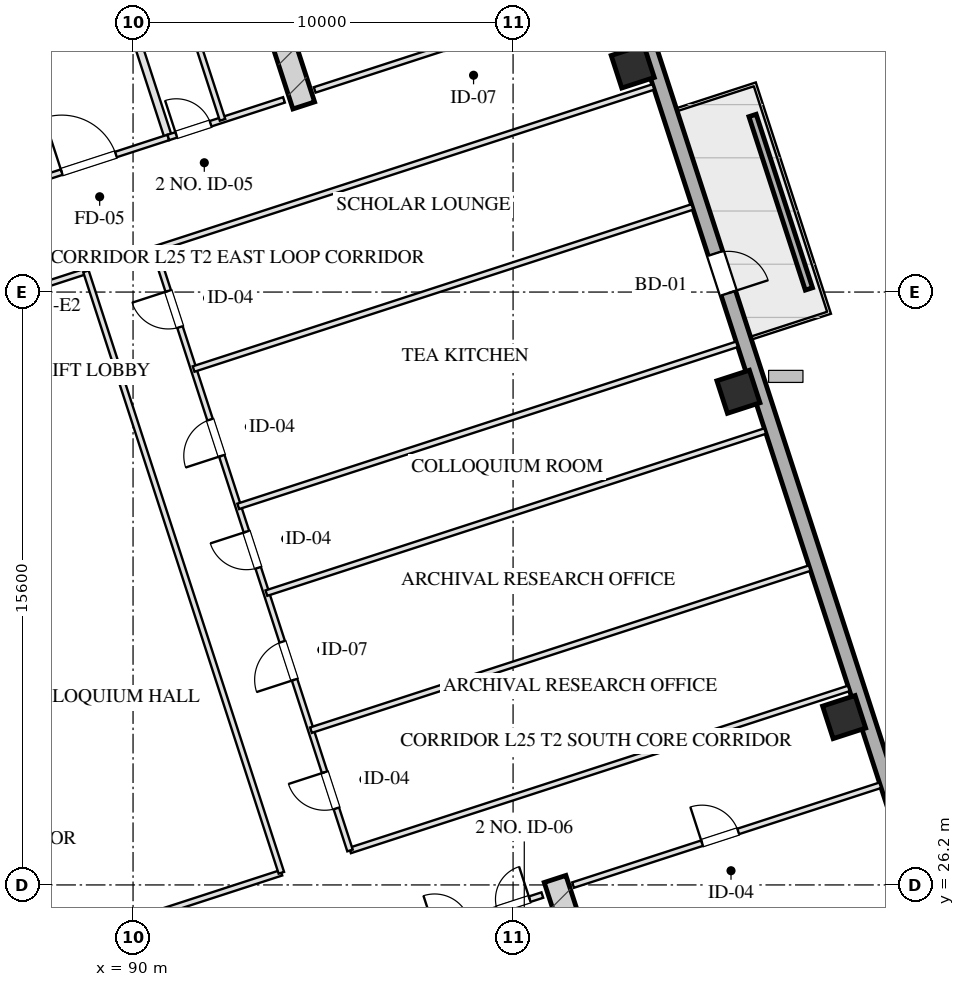
"""IFC4 building model, lengths in metres.
Left out: names, types, materials, properties, quantities, classifications, styles, units other than length and angle.
Written with IfcOpenShell. Run it as: python <this file> out.ifc"""

import sys

from ifc_helpers import new_model, si_unit, direction, frame, frame_2d, origin, origin_2d, place, context, subcontext, project, spatial, rectangle, hollow_rectangle, extrude, element, fill, save


model = new_model("IFC4")
c1 = context("Model", 3, precision=1e-05, world=origin(), true_north=direction((0.0, 1.0)))
c2 = subcontext(c1, "Body", "Model", "MODEL_VIEW")
j1 = project(units=[si_unit("LENGTHUNIT", "METRE"), si_unit("PLANEANGLEUNIT", "RADIAN")], contexts=[c1])
p1 = place(None, origin())
s1 = spatial("IfcSite", under=j1, at=p1, CompositionType="ELEMENT")
p2 = place(p1, origin())
s2 = spatial("IfcBuilding", under=s1, at=p2, CompositionType="ELEMENT")
p3 = place(p2, frame((0.0, 0.0, 100.05)))
s3 = spatial("IfcBuildingStorey", under=s2, at=p3, CompositionType="ELEMENT", Elevation=100.05)
for number, where, z_axis, x_axis in (
    (1, (101.105, 26.358, 0.0), (0.0, 0.0, 1.0), (0.309, -0.951, 0.0)),
    (2, (94.492, 46.71, 0.0), (0.0, 0.0, 1.0), (-0.309, 0.951, 0.0)),
):
    element("IfcWall", number, at=place(p3, frame(where, z_axis=z_axis, x_axis=x_axis)), inside=s3, PredefinedType="SHEAR", context=c2, shape_type="SweptSolid", body=[
        extrude(rectangle(XDim=9.48, YDim=0.6, at=frame_2d((4.74, 0.0))), origin(), (0.0, 0.0, 1.0), 3.45),
    ])
for number, where, z_axis, x_axis in (
    (3, (108.711, 30.616, 0.0), (0.0, 0.0, 1.0), (0.951, 0.309, 0.0)),
    (4, (105.93, 39.176, 0.0), (0.0, 0.0, 1.0), (0.951, 0.309, 0.0)),
    (5, (103.149, 47.736, 0.0), (0.0, 0.0, 1.0), (0.951, 0.309, 0.0)),
):
    element("IfcColumn", number, at=place(p3, frame(where, z_axis=z_axis, x_axis=x_axis)), inside=s3, PredefinedType="COLUMN", context=c2, shape_type="SweptSolid", body=[
        extrude(hollow_rectangle(XDim=0.9, YDim=0.9, WallThickness=0.032, at=origin_2d()), origin(), (0.0, 0.0, 1.0), 3.451),
    ])
p4 = place(p3, frame((99.284, 61.41, 0.0), z_axis=(0.0, 0.0, 1.0), x_axis=(0.309017542002, -0.95105633836, 0.0)))
e6 = element("IfcWall", 6, at=p4, inside=s3, PredefinedType="SOLIDWALL", context=c2, shape_type="SweptSolid", body=[
    extrude(rectangle(XDim=46.4, YDim=0.4, at=frame_2d((23.2, 0.0))), origin(), (0.0, 0.0, 1.0), 2.55),
])
p5 = place(p4, frame((19.55, 0.0, 0.0)))
e7 = element("IfcOpeningElement", 7, at=p5, cuts=e6, PredefinedType="OPENING", context=c2, shape_type="SweptSolid", body=[
    extrude(rectangle(XDim=1.1, YDim=2.15, at=frame_2d((0.55, 1.075))), frame((0.0, 0.21, 0.0), z_axis=(0.0, -1.0, 0.0), x_axis=(1.0, 0.0, 0.0)), (0.0, 0.0, 1.0), 0.42),
])
p6 = place(p3, frame((107.785, 41.882, 0.0), z_axis=(0.0, 0.0, 1.0), x_axis=(-0.309032019345, 0.951051634255, 0.0)))
e8 = element("IfcWall", 8, at=p6, inside=s3, PredefinedType="PARAPET", context=c2, shape_type="SweptSolid", body=[
    extrude(rectangle(XDim=4.8, YDim=0.2, at=frame_2d((2.4, 0.0))), origin(), (0.0, 0.0, 1.0), 0.75),
])
p7 = place(p3, frame((97.727, 24.944, 0.0), z_axis=(0.0, 0.0, 1.0), x_axis=(0.951036872128, 0.309077446369, 0.0)))
e9 = element("IfcWall", 9, at=p7, inside=s3, PredefinedType="PARTITIONING", context=c2, shape_type="SweptSolid", body=[
    extrude(rectangle(XDim=3.2, YDim=0.15, at=frame_2d((1.6, 0.0))), origin(), (0.0, 0.0, 1.0), 3.155),
])
p8 = place(p7, frame((0.22, 0.0, 0.0)))
e10 = element("IfcOpeningElement", 10, at=p8, cuts=e9, PredefinedType="OPENING", context=c2, shape_type="SweptSolid", body=[
    extrude(rectangle(XDim=0.95, YDim=2.05, at=frame_2d((0.475, 1.025))), frame((0.0, 0.085, 0.0), z_axis=(0.0, -1.0, 0.0), x_axis=(1.0, 0.0, 0.0)), (0.0, 0.0, 1.0), 0.17),
])
p9 = place(p7, frame((1.95, 0.0, 0.0)))
e11 = element("IfcOpeningElement", 11, at=p9, cuts=e9, PredefinedType="OPENING", context=c2, shape_type="SweptSolid", body=[
    extrude(rectangle(XDim=0.9, YDim=2.05, at=frame_2d((0.45, 1.025))), frame((0.0, 0.085, 0.0), z_axis=(0.0, -1.0, 0.0), x_axis=(1.0, 0.0, 0.0)), (0.0, 0.0, 1.0), 0.17),
])
p10 = place(p3, frame((90.928, 45.868, 0.0), z_axis=(0.0, 0.0, 1.0), x_axis=(-0.309042196757, 0.951048327176, 0.0)))
e12 = element("IfcWall", 12, at=p10, inside=s3, PredefinedType="PARTITIONING", context=c2, shape_type="SweptSolid", body=[
    extrude(rectangle(XDim=8.43, YDim=0.2, at=frame_2d((4.215, 0.0))), origin(), (0.0, 0.0, 1.0), 3.155),
])
p11 = place(p3, frame((86.743, 44.508, 0.0), z_axis=(0.0, 0.0, 1.0), x_axis=(0.951063829732, 0.308994485023, 0.0)))
e13 = element("IfcWall", 13, at=p11, inside=s3, PredefinedType="PARTITIONING", context=c2, shape_type="SweptSolid", body=[
    extrude(rectangle(XDim=4.4, YDim=0.15, at=frame_2d((2.2, 0.0))), origin(), (0.0, 0.0, 1.0), 3.155),
])
p12 = place(p11, frame((1.45, 0.0, 0.0)))
e14 = element("IfcOpeningElement", 14, at=p12, cuts=e13, PredefinedType="OPENING", context=c2, shape_type="SweptSolid", body=[
    extrude(rectangle(XDim=1.5, YDim=2.05, at=frame_2d((0.75, 1.025))), frame((0.0, 0.085, 0.0), z_axis=(0.0, -1.0, 0.0), x_axis=(1.0, 0.0, 0.0)), (0.0, 0.0, 1.0), 0.17),
])
p13 = place(p3, frame((85.718, 47.666, 0.0), z_axis=(0.0, 0.0, 1.0), x_axis=(0.951058531764, 0.30901079133, 0.0)))
e15 = element("IfcWall", 15, at=p13, inside=s3, PredefinedType="PARTITIONING", context=c2, shape_type="SweptSolid", body=[
    extrude(rectangle(XDim=4.4, YDim=0.2, at=frame_2d((2.2, 0.0))), origin(), (0.0, 0.0, 1.0), 3.155),
])
p14 = place(p13, frame((0.45, 0.0, 0.0)))
e16 = element("IfcOpeningElement", 16, at=p14, cuts=e15, PredefinedType="OPENING", context=c2, shape_type="SweptSolid", body=[
    extrude(rectangle(XDim=1.1, YDim=2.05, at=frame_2d((0.55, 1.025))), frame((0.0, 0.11, 0.0), z_axis=(0.0, -1.0, 0.0), x_axis=(1.0, 0.0, 0.0)), (0.0, 0.0, 1.0), 0.22),
])
p15 = place(p13, frame((2.55, 0.0, 0.0)))
e17 = element("IfcOpeningElement", 17, at=p15, cuts=e15, PredefinedType="OPENING", context=c2, shape_type="SweptSolid", body=[
    extrude(rectangle(XDim=1.1, YDim=2.05, at=frame_2d((0.55, 1.025))), frame((0.0, 0.11, 0.0), z_axis=(0.0, -1.0, 0.0), x_axis=(1.0, 0.0, 0.0)), (0.0, 0.0, 1.0), 0.22),
])
p16 = place(p3, frame((90.928, 45.868, 0.0), z_axis=(0.0, 0.0, 1.0), x_axis=(0.951059297078, 0.309008435874, 0.0)))
e18 = element("IfcWall", 18, at=p16, inside=s3, PredefinedType="PARTITIONING", context=c2, shape_type="SweptSolid", body=[
    extrude(rectangle(XDim=3.2, YDim=0.15, at=frame_2d((1.6, 0.0))), origin(), (0.0, 0.0, 1.0), 3.155),
])
p17 = place(p16, frame((0.22, 0.0, 0.0)))
e19 = element("IfcOpeningElement", 19, at=p17, cuts=e18, PredefinedType="OPENING", context=c2, shape_type="SweptSolid", body=[
    extrude(rectangle(XDim=0.95, YDim=2.05, at=frame_2d((0.475, 1.025))), frame((0.0, 0.085, 0.0), z_axis=(0.0, -1.0, 0.0), x_axis=(1.0, 0.0, 0.0)), (0.0, 0.0, 1.0), 0.17),
])
p18 = place(p3, frame((92.355, 46.331, 0.0), z_axis=(0.0, 0.0, 1.0), x_axis=(-0.309007490203, 0.951059604335, 0.0)))
e20 = element("IfcWall", 20, at=p18, inside=s3, PredefinedType="PARTITIONING", context=c2, shape_type="SweptSolid", body=[
    extrude(rectangle(XDim=8.43, YDim=0.15, at=frame_2d((4.215, 0.0))), origin(), (0.0, 0.0, 1.0), 3.155),
])
p19 = place(p18, frame((2.55, 0.0, 0.0)))
e21 = element("IfcOpeningElement", 21, at=p19, cuts=e20, PredefinedType="OPENING", context=c2, shape_type="SweptSolid", body=[
    extrude(rectangle(XDim=0.95, YDim=2.05, at=frame_2d((0.475, 1.025))), frame((0.0, 0.085, 0.0), z_axis=(0.0, -1.0, 0.0), x_axis=(1.0, 0.0, 0.0)), (0.0, 0.0, 1.0), 0.17),
])
p20 = place(p18, frame((5.8, 0.0, 0.0)))
e22 = element("IfcOpeningElement", 22, at=p20, cuts=e20, PredefinedType="OPENING", context=c2, shape_type="SweptSolid", body=[
    extrude(rectangle(XDim=0.9, YDim=2.05, at=frame_2d((0.45, 1.025))), frame((0.0, 0.085, 0.0), z_axis=(0.0, -1.0, 0.0), x_axis=(1.0, 0.0, 0.0)), (0.0, 0.0, 1.0), 0.17),
])
p21 = place(p3, frame((101.578, 26.196, 0.0), z_axis=(0.0, 0.0, 1.0), x_axis=(0.951062770994, 0.308997743729, 0.0)))
e23 = element("IfcWall", 23, at=p21, inside=s3, PredefinedType="PARTITIONING", context=c2, shape_type="SweptSolid", body=[
    extrude(rectangle(XDim=8.5, YDim=0.15, at=frame_2d((4.25, 0.0))), origin(), (0.0, 0.0, 1.0), 3.155),
])
p22 = place(p21, frame((3.57, 0.0, 0.0)))
e24 = element("IfcOpeningElement", 24, at=p22, cuts=e23, PredefinedType="OPENING", context=c2, shape_type="SweptSolid", body=[
    extrude(rectangle(XDim=1.0, YDim=2.05, at=frame_2d((0.5, 1.025))), frame((0.0, 0.085, 0.0), z_axis=(0.0, -1.0, 0.0), x_axis=(1.0, 0.0, 0.0)), (0.0, 0.0, 1.0), 0.17),
])
p23 = place(p3, frame((94.78, 47.119, 0.0), z_axis=(0.0, 0.0, 1.0), x_axis=(0.951054329824, 0.309023723562, 0.0)))
e25 = element("IfcWall", 25, at=p23, inside=s3, PredefinedType="PARTITIONING", context=c2, shape_type="SweptSolid", body=[
    extrude(rectangle(XDim=8.5, YDim=0.15, at=frame_2d((4.25, 0.0))), origin(), (0.0, 0.0, 1.0), 3.155),
])
p24 = place(p23, frame((3.57, 0.0, 0.0)))
e26 = element("IfcOpeningElement", 26, at=p24, cuts=e25, PredefinedType="OPENING", context=c2, shape_type="SweptSolid", body=[
    extrude(rectangle(XDim=1.05, YDim=2.05, at=frame_2d((0.525, 1.025))), frame((0.0, 0.085, 0.0), z_axis=(0.0, -1.0, 0.0), x_axis=(1.0, 0.0, 0.0)), (0.0, 0.0, 1.0), 0.17),
])
p25 = place(p3, frame((85.676, 23.847, 0.0), z_axis=(0.0, 0.0, 1.0), x_axis=(0.951063309554, 0.308996086091, 0.0)))
e27 = element("IfcWall", 27, at=p25, inside=s3, PredefinedType="PARTITIONING", context=c2, shape_type="SweptSolid", body=[
    extrude(rectangle(XDim=8.65, YDim=0.15, at=frame_2d((4.325, 0.0))), origin(), (0.0, 0.0, 1.0), 3.155),
])
p26 = place(p3, frame((95.709, 27.107, 0.0), z_axis=(0.0, 0.0, 1.0), x_axis=(0.951056688031, 0.309016465825, 0.0)))
e28 = element("IfcWall", 28, at=p26, inside=s3, PredefinedType="PARTITIONING", context=c2, shape_type="SweptSolid", body=[
    extrude(rectangle(XDim=13.8, YDim=0.15, at=frame_2d((6.9, 0.0))), origin(), (0.0, 0.0, 1.0), 3.155),
])
p27 = place(p3, frame((80.534, 39.672, 0.0), z_axis=(0.0, 0.0, 1.0), x_axis=(0.951052319652, 0.309029910015, 0.0)))
e29 = element("IfcWall", 29, at=p27, inside=s3, PredefinedType="PARTITIONING", context=c2, shape_type="SweptSolid", body=[
    extrude(rectangle(XDim=8.65, YDim=0.15, at=frame_2d((4.325, 0.0))), origin(), (0.0, 0.0, 1.0), 3.155),
])
p28 = place(p3, frame((90.567, 42.933, 0.0), z_axis=(0.0, 0.0, 1.0), x_axis=(0.951058377365, 0.309011266531, 0.0)))
e30 = element("IfcWall", 30, at=p28, inside=s3, PredefinedType="PARTITIONING", context=c2, shape_type="SweptSolid", body=[
    extrude(rectangle(XDim=13.8, YDim=0.15, at=frame_2d((6.9, 0.0))), origin(), (0.0, 0.0, 1.0), 3.155),
])
p29 = place(p3, frame((93.903, 26.52, 0.0), z_axis=(0.0, 0.0, 1.0), x_axis=(-0.30901773025, 0.951056277195, 0.0)))
e31 = element("IfcWall", 31, at=p29, inside=s3, PredefinedType="PARTITIONING", context=c2, shape_type="SweptSolid", body=[
    extrude(rectangle(XDim=16.64, YDim=0.15, at=frame_2d((8.32, 0.0))), origin(), (0.0, 0.0, 1.0), 3.155),
])
p30 = place(p3, frame((95.709, 27.107, 0.0), z_axis=(0.0, 0.0, 1.0), x_axis=(-0.30901773025, 0.951056277195, 0.0)))
e32 = element("IfcWall", 32, at=p30, inside=s3, PredefinedType="PARTITIONING", context=c2, shape_type="SweptSolid", body=[
    extrude(rectangle(XDim=16.64, YDim=0.15, at=frame_2d((8.32, 0.0))), origin(), (0.0, 0.0, 1.0), 3.155),
])
p31 = place(p30, frame((1.164, 0.0, 0.0)))
e33 = element("IfcOpeningElement", 33, at=p31, cuts=e32, PredefinedType="OPENING", context=c2, shape_type="SweptSolid", body=[
    extrude(rectangle(XDim=1.0, YDim=2.05, at=frame_2d((0.5, 1.025))), frame((0.0, 0.085, 0.0), z_axis=(0.0, -1.0, 0.0), x_axis=(1.0, 0.0, 0.0)), (0.0, 0.0, 1.0), 0.17),
])
p32 = place(p30, frame((4.724, 0.0, 0.0)))
e34 = element("IfcOpeningElement", 34, at=p32, cuts=e32, PredefinedType="OPENING", context=c2, shape_type="SweptSolid", body=[
    extrude(rectangle(XDim=1.05, YDim=2.05, at=frame_2d((0.525, 1.025))), frame((0.0, 0.085, 0.0), z_axis=(0.0, -1.0, 0.0), x_axis=(1.0, 0.0, 0.0)), (0.0, 0.0, 1.0), 0.17),
])
p33 = place(p30, frame((7.82, 0.0, 0.0)))
e35 = element("IfcOpeningElement", 35, at=p33, cuts=e32, PredefinedType="OPENING", context=c2, shape_type="SweptSolid", body=[
    extrude(rectangle(XDim=1.0, YDim=2.05, at=frame_2d((0.5, 1.025))), frame((0.0, 0.085, 0.0), z_axis=(0.0, -1.0, 0.0), x_axis=(1.0, 0.0, 0.0)), (0.0, 0.0, 1.0), 0.17),
])
p34 = place(p30, frame((10.92, 0.0, 0.0)))
e36 = element("IfcOpeningElement", 36, at=p34, cuts=e32, PredefinedType="OPENING", context=c2, shape_type="SweptSolid", body=[
    extrude(rectangle(XDim=1.0, YDim=2.05, at=frame_2d((0.5, 1.025))), frame((0.0, 0.085, 0.0), z_axis=(0.0, -1.0, 0.0), x_axis=(1.0, 0.0, 0.0)), (0.0, 0.0, 1.0), 0.17),
])
p35 = place(p30, frame((14.48, 0.0, 0.0)))
e37 = element("IfcOpeningElement", 37, at=p35, cuts=e32, PredefinedType="OPENING", context=c2, shape_type="SweptSolid", body=[
    extrude(rectangle(XDim=1.0, YDim=2.05, at=frame_2d((0.5, 1.025))), frame((0.0, 0.085, 0.0), z_axis=(0.0, -1.0, 0.0), x_axis=(1.0, 0.0, 0.0)), (0.0, 0.0, 1.0), 0.17),
])
p36 = place(p3, frame((94.681, 30.272, 0.0), z_axis=(0.0, 0.0, 1.0), x_axis=(0.951051488548, 0.309032467762, 0.0)))
e38 = element("IfcWall", 38, at=p36, inside=s3, PredefinedType="PARTITIONING", context=c2, shape_type="SweptSolid", body=[
    extrude(rectangle(XDim=13.8, YDim=0.15, at=frame_2d((6.9, 0.0))), origin(), (0.0, 0.0, 1.0), 3.155),
])
p37 = place(p3, frame((93.509, 33.878, 0.0), z_axis=(0.0, 0.0, 1.0), x_axis=(0.951056688031, 0.309016465825, 0.0)))
e39 = element("IfcWall", 39, at=p37, inside=s3, PredefinedType="PARTITIONING", context=c2, shape_type="SweptSolid", body=[
    extrude(rectangle(XDim=13.8, YDim=0.15, at=frame_2d((6.9, 0.0))), origin(), (0.0, 0.0, 1.0), 3.155),
])
p38 = place(p3, frame((92.768, 36.161, 0.0), z_axis=(0.0, 0.0, 1.0), x_axis=(0.951058377365, 0.309011266531, 0.0)))
e40 = element("IfcWall", 40, at=p38, inside=s3, PredefinedType="PARTITIONING", context=c2, shape_type="SweptSolid", body=[
    extrude(rectangle(XDim=13.8, YDim=0.15, at=frame_2d((6.9, 0.0))), origin(), (0.0, 0.0, 1.0), 3.155),
])
p39 = place(p3, frame((91.594, 39.775, 0.0), z_axis=(0.0, 0.0, 1.0), x_axis=(0.951056688031, 0.309016465825, 0.0)))
e41 = element("IfcWall", 41, at=p39, inside=s3, PredefinedType="PARTITIONING", context=c2, shape_type="SweptSolid", body=[
    extrude(rectangle(XDim=13.8, YDim=0.15, at=frame_2d((6.9, 0.0))), origin(), (0.0, 0.0, 1.0), 3.155),
])
p40 = place(p5, origin())
e42 = element("IfcDoor", 42, at=p40, inside=s3, OperationType="SINGLE_SWING_RIGHT", PredefinedType="DOOR", context=c2, shape_type="SweptSolid", body=[
    extrude(rectangle(XDim=1.1, YDim=2.15, at=frame_2d((0.55, 1.075))), frame((0.0, 0.025, 0.0), z_axis=(0.0, -1.0, 0.0), x_axis=(1.0, 0.0, 0.0)), (0.0, 0.0, 1.0), 0.05),
])
fill(e7, e42)
p41 = place(p9, origin())
e43 = element("IfcDoor", 43, at=p41, inside=s3, OperationType="SINGLE_SWING_RIGHT", PredefinedType="DOOR", context=c2, shape_type="SweptSolid", body=[
    extrude(rectangle(XDim=0.9, YDim=2.05, at=frame_2d((0.45, 1.025))), frame((0.0, 0.025, 0.0), z_axis=(0.0, -1.0, 0.0), x_axis=(1.0, 0.0, 0.0)), (0.0, 0.0, 1.0), 0.05),
])
fill(e11, e43)
p42 = place(p12, origin())
e44 = element("IfcDoor", 44, at=p42, inside=s3, OperationType="SINGLE_SWING_LEFT", PredefinedType="DOOR", context=c2, shape_type="SweptSolid", body=[
    extrude(rectangle(XDim=1.5, YDim=2.05, at=frame_2d((0.75, 1.025))), frame((0.0, 0.025, 0.0), z_axis=(0.0, -1.0, 0.0), x_axis=(1.0, 0.0, 0.0)), (0.0, 0.0, 1.0), 0.05),
])
fill(e14, e44)
p43 = place(p17, origin())
e45 = element("IfcDoor", 45, at=p43, inside=s3, OperationType="SINGLE_SWING_LEFT", PredefinedType="DOOR", context=c2, shape_type="SweptSolid", body=[
    extrude(rectangle(XDim=0.95, YDim=2.05, at=frame_2d((0.475, 1.025))), frame((0.0, 0.025, 0.0), z_axis=(0.0, -1.0, 0.0), x_axis=(1.0, 0.0, 0.0)), (0.0, 0.0, 1.0), 0.05),
])
fill(e19, e45)
p44 = place(p22, origin())
e46 = element("IfcDoor", 46, at=p44, inside=s3, OperationType="SINGLE_SWING_LEFT", PredefinedType="DOOR", context=c2, shape_type="SweptSolid", body=[
    extrude(rectangle(XDim=1.0, YDim=2.05, at=frame_2d((0.5, 1.025))), frame((0.0, 0.025, 0.0), z_axis=(0.0, -1.0, 0.0), x_axis=(1.0, 0.0, 0.0)), (0.0, 0.0, 1.0), 0.05),
])
fill(e24, e46)
p45 = place(p31, origin())
e47 = element("IfcDoor", 47, at=p45, inside=s3, OperationType="SINGLE_SWING_RIGHT", PredefinedType="DOOR", context=c2, shape_type="SweptSolid", body=[
    extrude(rectangle(XDim=1.0, YDim=2.05, at=frame_2d((0.5, 1.025))), frame((0.0, 0.025, 0.0), z_axis=(0.0, -1.0, 0.0), x_axis=(1.0, 0.0, 0.0)), (0.0, 0.0, 1.0), 0.05),
])
fill(e33, e47)
p46 = place(p32, origin())
e48 = element("IfcDoor", 48, at=p46, inside=s3, OperationType="SINGLE_SWING_LEFT", PredefinedType="DOOR", context=c2, shape_type="SweptSolid", body=[
    extrude(rectangle(XDim=1.05, YDim=2.05, at=frame_2d((0.525, 1.025))), frame((0.0, 0.025, 0.0), z_axis=(0.0, -1.0, 0.0), x_axis=(1.0, 0.0, 0.0)), (0.0, 0.0, 1.0), 0.05),
])
fill(e34, e48)
p47 = place(p33, origin())
e49 = element("IfcDoor", 49, at=p47, inside=s3, OperationType="SINGLE_SWING_RIGHT", PredefinedType="DOOR", context=c2, shape_type="SweptSolid", body=[
    extrude(rectangle(XDim=1.0, YDim=2.05, at=frame_2d((0.5, 1.025))), frame((0.0, 0.025, 0.0), z_axis=(0.0, -1.0, 0.0), x_axis=(1.0, 0.0, 0.0)), (0.0, 0.0, 1.0), 0.05),
])
fill(e35, e49)
p48 = place(p34, origin())
e50 = element("IfcDoor", 50, at=p48, inside=s3, OperationType="SINGLE_SWING_LEFT", PredefinedType="DOOR", context=c2, shape_type="SweptSolid", body=[
    extrude(rectangle(XDim=1.0, YDim=2.05, at=frame_2d((0.5, 1.025))), frame((0.0, 0.025, 0.0), z_axis=(0.0, -1.0, 0.0), x_axis=(1.0, 0.0, 0.0)), (0.0, 0.0, 1.0), 0.05),
])
fill(e36, e50)
p49 = place(p35, origin())
e51 = element("IfcDoor", 51, at=p49, inside=s3, OperationType="SINGLE_SWING_RIGHT", PredefinedType="DOOR", context=c2, shape_type="SweptSolid", body=[
    extrude(rectangle(XDim=1.0, YDim=2.05, at=frame_2d((0.5, 1.025))), frame((0.0, 0.025, 0.0), z_axis=(0.0, -1.0, 0.0), x_axis=(1.0, 0.0, 0.0)), (0.0, 0.0, 1.0), 0.05),
])
fill(e37, e51)
save(model, sys.argv[1])
